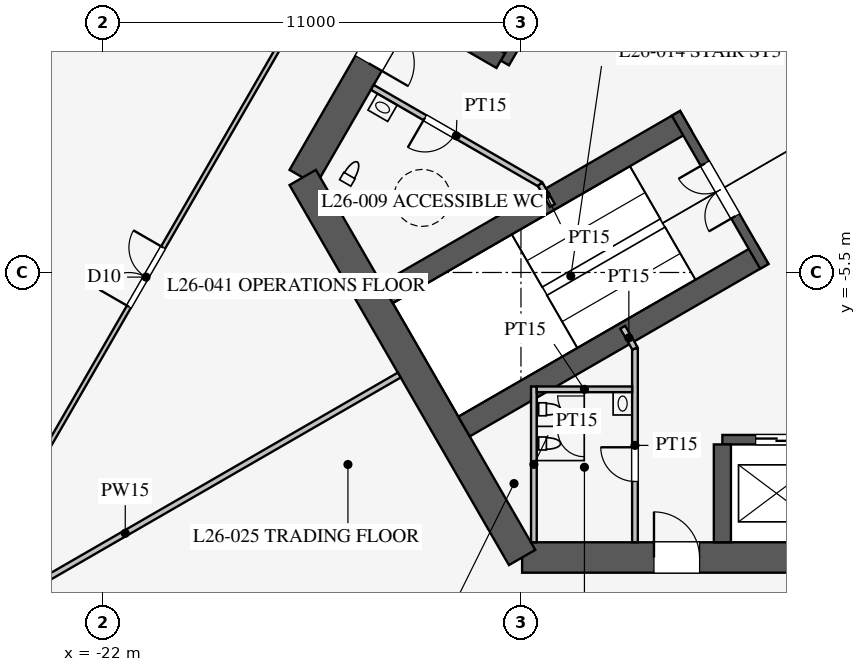
"""IFC4 building model, lengths in metres.
Left out: names, types, materials, properties, quantities, classifications, styles, units other than length and angle.
Written with IfcOpenShell. Run it as: python <this file> out.ifc"""

import sys

from ifc_helpers import new_model, si_unit, direction, frame, frame_2d, origin, place, context, subcontext, project, spatial, rectangle, extrude, element, fill, save


model = new_model("IFC4")
c1 = context("Model", 3, precision=1e-05, world=origin(), true_north=direction((0.0, 1.0)))
c2 = subcontext(c1, "Body", "Model", "MODEL_VIEW")
j1 = project(units=[si_unit("LENGTHUNIT", "METRE"), si_unit("PLANEANGLEUNIT", "RADIAN")], contexts=[c1])
p1 = place(None, origin())
s1 = spatial("IfcSite", under=j1, at=p1, CompositionType="ELEMENT")
p2 = place(p1, origin())
s2 = spatial("IfcBuilding", under=s1, at=p2, CompositionType="ELEMENT")
p3 = place(p2, frame((0.0, 0.0, 115.7)))
s3 = spatial("IfcBuildingStorey", under=s2, at=p3, CompositionType="ELEMENT", Elevation=115.7)
p4 = place(p3, frame((-10.97, -13.0, 0.0), z_axis=(0.0, 0.0, 1.0), x_axis=(1.0, 0.0, 0.0)))
e1 = element("IfcWall", 1, at=p4, inside=s3, PredefinedType="SHEAR", context=c2, shape_type="SweptSolid", body=[
    extrude(rectangle(XDim=21.939, YDim=0.8, at=frame_2d((10.97, 0.0))), origin(), (0.0, 0.0, 1.0), 4.2),
])
p5 = place(p4, frame((17.27, 0.0, 0.0)))
e2 = element("IfcOpeningElement", 2, at=p5, cuts=e1, PredefinedType="OPENING", context=c2, shape_type="SweptSolid", body=[
    extrude(rectangle(XDim=1.2, YDim=2.1, at=frame_2d((0.6, 1.05))), frame((0.0, 0.41, 0.0), z_axis=(0.0, -1.0, 0.0), x_axis=(1.0, 0.0, 0.0)), (0.0, 0.0, 1.0), 0.82),
])
p6 = place(p4, frame((3.47, 0.0, 0.0)))
e3 = element("IfcOpeningElement", 3, at=p6, cuts=e1, PredefinedType="OPENING", context=c2, shape_type="SweptSolid", body=[
    extrude(rectangle(XDim=1.2, YDim=2.1, at=frame_2d((0.6, 1.05))), frame((0.0, 0.41, 0.0), z_axis=(0.0, -1.0, 0.0), x_axis=(1.0, 0.0, 0.0)), (0.0, 0.0, 1.0), 0.82),
])
p7 = place(p3, frame((-5.773, 16.0, 0.0), z_axis=(0.0, 0.0, 1.0), x_axis=(-0.500002442456, -0.866023993627, 0.0)))
e4 = element("IfcWall", 4, at=p7, inside=s3, PredefinedType="SHEAR", context=c2, shape_type="SweptSolid", body=[
    extrude(rectangle(XDim=21.939, YDim=0.8, at=frame_2d((10.97, 0.0))), origin(), (0.0, 0.0, 1.0), 4.2),
])
p8 = place(p7, frame((17.27, 0.0, 0.0)))
e5 = element("IfcOpeningElement", 5, at=p8, cuts=e4, PredefinedType="OPENING", context=c2, shape_type="SweptSolid", body=[
    extrude(rectangle(XDim=1.2, YDim=2.1, at=frame_2d((0.6, 1.05))), frame((0.0, 0.41, 0.0), z_axis=(0.0, -1.0, 0.0), x_axis=(1.0, 0.0, 0.0)), (0.0, 0.0, 1.0), 0.82),
])
p9 = place(p7, frame((3.47, 0.0, 0.0)))
e6 = element("IfcOpeningElement", 6, at=p9, cuts=e4, PredefinedType="OPENING", context=c2, shape_type="SweptSolid", body=[
    extrude(rectangle(XDim=1.2, YDim=2.1, at=frame_2d((0.6, 1.05))), frame((0.0, 0.41, 0.0), z_axis=(0.0, -1.0, 0.0), x_axis=(1.0, 0.0, 0.0)), (0.0, 0.0, 1.0), 0.82),
])
p10 = place(p3, frame((-16.743, -3.0, 0.0), z_axis=(0.0, 0.0, 1.0), x_axis=(0.499995765644, -0.866027848477, 0.0)))
e7 = element("IfcWall", 7, at=p10, inside=s3, PredefinedType="SHEAR", context=c2, shape_type="SweptSolid", body=[
    extrude(rectangle(XDim=11.547, YDim=0.8, at=frame_2d((5.773, 0.0))), origin(), (0.0, 0.0, 1.0), 4.2),
])
p11 = place(p3, frame((-5.7, -9.9, 0.0), z_axis=(0.0, 0.0, 1.0), x_axis=(1.0, 0.0, 0.0)))
e8 = element("IfcWall", 8, at=p11, inside=s3, PredefinedType="SHEAR", context=c2, shape_type="SweptSolid", body=[
    extrude(rectangle(XDim=11.4, YDim=0.25, at=frame_2d((5.7, 0.0))), origin(), (0.0, 0.0, 1.0), 4.2),
])
p12 = place(p11, frame((0.875, 0.0, 0.0)))
e9 = element("IfcOpeningElement", 9, at=p12, cuts=e8, PredefinedType="OPENING", context=c2, shape_type="SweptSolid", body=[
    extrude(rectangle(XDim=1.1, YDim=2.2, at=frame_2d((0.55, 1.1))), frame((0.0, 0.135, 0.0), z_axis=(0.0, -1.0, 0.0), x_axis=(1.0, 0.0, 0.0)), (0.0, 0.0, 1.0), 0.27),
])
p13 = place(p11, frame((3.725, 0.0, 0.0)))
e10 = element("IfcOpeningElement", 10, at=p13, cuts=e8, PredefinedType="OPENING", context=c2, shape_type="SweptSolid", body=[
    extrude(rectangle(XDim=1.1, YDim=2.2, at=frame_2d((0.55, 1.1))), frame((0.0, 0.135, 0.0), z_axis=(0.0, -1.0, 0.0), x_axis=(1.0, 0.0, 0.0)), (0.0, 0.0, 1.0), 0.27),
])
p14 = place(p11, frame((6.575, 0.0, 0.0)))
e11 = element("IfcOpeningElement", 11, at=p14, cuts=e8, PredefinedType="OPENING", context=c2, shape_type="SweptSolid", body=[
    extrude(rectangle(XDim=1.1, YDim=2.2, at=frame_2d((0.55, 1.1))), frame((0.0, 0.135, 0.0), z_axis=(0.0, -1.0, 0.0), x_axis=(1.0, 0.0, 0.0)), (0.0, 0.0, 1.0), 0.27),
])
p15 = place(p11, frame((9.425, 0.0, 0.0)))
e12 = element("IfcOpeningElement", 12, at=p15, cuts=e8, PredefinedType="OPENING", context=c2, shape_type="SweptSolid", body=[
    extrude(rectangle(XDim=1.1, YDim=2.2, at=frame_2d((0.55, 1.1))), frame((0.0, 0.135, 0.0), z_axis=(0.0, -1.0, 0.0), x_axis=(1.0, 0.0, 0.0)), (0.0, 0.0, 1.0), 0.27),
])
p16 = place(p3, frame((-5.7, -10.025, 0.0), z_axis=(0.0, 0.0, 1.0), x_axis=(0.0, -1.0, 0.0)))
e13 = element("IfcWall", 13, at=p16, inside=s3, PredefinedType="SHEAR", context=c2, shape_type="SweptSolid", body=[
    extrude(rectangle(XDim=2.575, YDim=0.45, at=frame_2d((1.288, 0.0))), origin(), (0.0, 0.0, 1.0), 4.2),
])
p17 = place(p3, frame((-5.724, 9.886, 0.0), z_axis=(0.0, 0.0, 1.0), x_axis=(-0.500001763848, -0.866024385424, 0.0)))
e14 = element("IfcWall", 14, at=p17, inside=s3, PredefinedType="SHEAR", context=c2, shape_type="SweptSolid", body=[
    extrude(rectangle(XDim=11.4, YDim=0.25, at=frame_2d((5.7, 0.0))), origin(), (0.0, 0.0, 1.0), 4.2),
])
p18 = place(p17, frame((6.525, 0.0, 0.0)))
e15 = element("IfcOpeningElement", 15, at=p18, cuts=e14, PredefinedType="OPENING", context=c2, shape_type="SweptSolid", body=[
    extrude(rectangle(XDim=1.2, YDim=2.2, at=frame_2d((0.6, 1.1))), frame((0.0, 0.135, 0.0), z_axis=(0.0, -1.0, 0.0), x_axis=(1.0, 0.0, 0.0)), (0.0, 0.0, 1.0), 0.27),
])
p19 = place(p17, frame((9.375, 0.0, 0.0)))
e16 = element("IfcOpeningElement", 16, at=p19, cuts=e14, PredefinedType="OPENING", context=c2, shape_type="SweptSolid", body=[
    extrude(rectangle(XDim=1.2, YDim=2.2, at=frame_2d((0.6, 1.1))), frame((0.0, 0.135, 0.0), z_axis=(0.0, -1.0, 0.0), x_axis=(1.0, 0.0, 0.0)), (0.0, 0.0, 1.0), 0.27),
])
p20 = place(p3, frame((-11.532, 0.076, 0.0), z_axis=(0.0, 0.0, 1.0), x_axis=(-0.866005588531, 0.500034319456, 0.0)))
e17 = element("IfcWall", 17, at=p20, inside=s3, PredefinedType="SHEAR", context=c2, shape_type="SweptSolid", body=[
    extrude(rectangle(XDim=2.575, YDim=0.45, at=frame_2d((1.288, 0.0))), origin(), (0.0, 0.0, 1.0), 4.2),
])
for number, where, z_axis, x_axis in (
    (18, (-6.663, -1.509, 0.0), (0.0, 0.0, 1.0), (-0.866, -0.5, 0.0)),
    (19, (-4.638, -5.016, 0.0), (0.0, 0.0, 1.0), (-0.866, -0.5, 0.0)),
):
    element("IfcWall", number, at=place(p3, frame(where, z_axis=z_axis, x_axis=x_axis)), inside=s3, PredefinedType="SHEAR", context=c2, shape_type="SweptSolid", body=[
        extrude(rectangle(XDim=9.075, YDim=0.6, at=frame_2d((4.538, 0.0))), origin(), (0.0, 0.0, 1.0), 4.2),
    ])
p21 = place(p3, frame((-6.922, -1.312, 0.0), z_axis=(0.0, 0.0, 1.0), x_axis=(0.499984536904, -0.866034331223, 0.0)))
e20 = element("IfcWall", 20, at=p21, inside=s3, PredefinedType="SHEAR", context=c2, shape_type="SweptSolid", body=[
    extrude(rectangle(XDim=4.65, YDim=0.25, at=frame_2d((2.325, 0.0))), origin(), (0.0, 0.0, 1.0), 4.2),
])
p22 = place(p21, frame((1.525, 0.0, 0.0)))
e21 = element("IfcOpeningElement", 21, at=p22, cuts=e20, PredefinedType="OPENING", context=c2, shape_type="SweptSolid", body=[
    extrude(rectangle(XDim=1.6, YDim=2.1, at=frame_2d((0.8, 1.05))), frame((0.0, 0.135, 0.0), z_axis=(0.0, -1.0, 0.0), x_axis=(1.0, 0.0, 0.0)), (0.0, 0.0, 1.0), 0.27),
])
p23 = place(p3, frame((-8.0, -7.5, 0.0), z_axis=(0.0, 0.0, 1.0), x_axis=(0.0, -1.0, 0.0)))
e22 = element("IfcWall", 22, at=p23, inside=s3, PredefinedType="PARTITIONING", context=c2, shape_type="SweptSolid", body=[
    extrude(rectangle(XDim=5.1, YDim=0.15, at=frame_2d((2.55, 0.0))), origin(), (0.0, 0.0, 1.0), 4.0),
])
p24 = place(p23, frame((2.6, 0.0, 0.0)))
e23 = element("IfcOpeningElement", 23, at=p24, cuts=e22, PredefinedType="OPENING", context=c2, shape_type="SweptSolid", body=[
    extrude(rectangle(XDim=0.9, YDim=2.1, at=frame_2d((0.45, 1.05))), frame((0.0, 0.085, 0.0), z_axis=(0.0, -1.0, 0.0), x_axis=(1.0, 0.0, 0.0)), (0.0, 0.0, 1.0), 0.17),
])
p25 = place(p3, frame((-10.495, -3.178, 0.0), z_axis=(0.0, 0.0, 1.0), x_axis=(-0.86602216432, 0.500005610874, 0.0)))
e24 = element("IfcWall", 24, at=p25, inside=s3, PredefinedType="PARTITIONING", context=c2, shape_type="SweptSolid", body=[
    extrude(rectangle(XDim=5.1, YDim=0.15, at=frame_2d((2.55, 0.0))), origin(), (0.0, 0.0, 1.0), 4.0),
])
p26 = place(p25, frame((2.6, 0.0, 0.0)))
e25 = element("IfcOpeningElement", 25, at=p26, cuts=e24, PredefinedType="OPENING", context=c2, shape_type="SweptSolid", body=[
    extrude(rectangle(XDim=0.9, YDim=2.1, at=frame_2d((0.45, 1.05))), frame((0.0, 0.085, 0.0), z_axis=(0.0, -1.0, 0.0), x_axis=(1.0, 0.0, 0.0)), (0.0, 0.0, 1.0), 0.17),
])
for number, where, z_axis, x_axis in (
    (26, (-10.495, -3.178, 0.0), (0.0, 0.0, 1.0), (0.5, -0.866, 0.0)),
    (27, (-8.0, -7.5, 0.0), (0.0, 0.0, 1.0), (-0.5, 0.866, 0.0)),
):
    element("IfcWall", number, at=place(p3, frame(where, z_axis=z_axis, x_axis=x_axis)), inside=s3, PredefinedType="PARTITIONING", context=c2, shape_type="SweptSolid", body=[
        extrude(rectangle(XDim=0.645, YDim=0.15, at=frame_2d((0.323, 0.0))), origin(), (0.0, 0.0, 1.0), 4.0),
    ])
p27 = place(p3, frame((-10.66, -8.5, 0.0), z_axis=(0.0, 0.0, 1.0), x_axis=(0.0, -1.0, 0.0)))
e28 = element("IfcWall", 28, at=p27, inside=s3, PredefinedType="PARTITIONING", context=c2, shape_type="SweptSolid", body=[
    extrude(rectangle(XDim=4.1, YDim=0.15, at=frame_2d((2.05, 0.0))), origin(), (0.0, 0.0, 1.0), 4.0),
])
p28 = place(p3, frame((-8.075, -8.575, 0.0), z_axis=(0.0, 0.0, 1.0), x_axis=(-1.0, 0.0, 0.0)))
e29 = element("IfcWall", 29, at=p28, inside=s3, PredefinedType="PARTITIONING", context=c2, shape_type="SweptSolid", body=[
    extrude(rectangle(XDim=2.51, YDim=0.15, at=frame_2d((1.255, 0.0))), origin(), (0.0, 0.0, 1.0), 4.0),
])
p29 = place(p3, frame((-14.203, -8.2, 0.0), z_axis=(0.0, 0.0, 1.0), x_axis=(-0.866024668836, -0.500001272966, 0.0)))
e30 = element("IfcWall", 30, at=p29, inside=s3, PredefinedType="PARTITIONING", context=c2, shape_type="SweptSolid", body=[
    extrude(rectangle(XDim=16.65, YDim=0.15, at=frame_2d((8.325, 0.0))), origin(), (0.0, 0.0, 1.0), 2.3),
])
p30 = place(p3, frame((-0.016, 30.491, 0.0), z_axis=(0.0, 0.0, 1.0), x_axis=(-0.50000091641, -0.866024874695, 0.0)))
e31 = element("IfcWall", 31, at=p30, inside=s3, PredefinedType="PARTITIONING", context=c2, shape_type="SweptSolid", body=[
    extrude(rectangle(XDim=52.796, YDim=0.12, at=frame_2d((26.398, 0.0))), origin(), (0.0, 0.0, 1.0), 2.9),
])
p31 = place(p30, frame((10.2, 0.0, 0.15)))
e32 = element("IfcOpeningElement", 32, at=p31, cuts=e31, PredefinedType="OPENING", context=c2, shape_type="SweptSolid", body=[
    extrude(rectangle(XDim=1.8, YDim=2.1, at=frame_2d((0.9, 1.05))), frame((0.0, 0.07, 0.0), z_axis=(0.0, -1.0, 0.0), x_axis=(1.0, 0.0, 0.0)), (0.0, 0.0, 1.0), 0.14),
])
p32 = place(p30, frame((40.8, 0.0, 0.15)))
e33 = element("IfcOpeningElement", 33, at=p32, cuts=e31, PredefinedType="OPENING", context=c2, shape_type="SweptSolid", body=[
    extrude(rectangle(XDim=1.8, YDim=2.1, at=frame_2d((0.9, 1.05))), frame((0.0, 0.07, 0.0), z_axis=(0.0, -1.0, 0.0), x_axis=(1.0, 0.0, 0.0)), (0.0, 0.0, 1.0), 0.14),
])
p33 = place(p24, frame((0.9, 0.0, 0.0), z_axis=(0.0, 0.0, 1.0), x_axis=(-1.0, 0.0, 0.0)))
e34 = element("IfcDoor", 34, at=p33, inside=s3, OperationType="SINGLE_SWING_RIGHT", PredefinedType="DOOR", context=c2, shape_type="SweptSolid", body=[
    extrude(rectangle(XDim=0.9, YDim=2.1, at=frame_2d((0.45, 1.05))), frame((0.0, 0.025, 0.0), z_axis=(0.0, -1.0, 0.0), x_axis=(1.0, 0.0, 0.0)), (0.0, 0.0, 1.0), 0.05),
])
fill(e23, e34)
p34 = place(p26, origin())
e35 = element("IfcDoor", 35, at=p34, inside=s3, OperationType="SINGLE_SWING_RIGHT", PredefinedType="DOOR", context=c2, shape_type="SweptSolid", body=[
    extrude(rectangle(XDim=0.9, YDim=2.1, at=frame_2d((0.45, 1.05))), frame((0.0, 0.025, 0.0), z_axis=(0.0, -1.0, 0.0), x_axis=(1.0, 0.0, 0.0)), (0.0, 0.0, 1.0), 0.05),
])
fill(e25, e35)
p35 = place(p22, frame((1.6, 0.0, 0.0), z_axis=(0.0, 0.0, 1.0), x_axis=(-1.0, 0.0, 0.0)))
e36 = element("IfcDoor", 36, at=p35, inside=s3, OperationType="DOUBLE_DOOR_SINGLE_SWING", PredefinedType="DOOR", context=c2, shape_type="SweptSolid", body=[
    extrude(rectangle(XDim=1.6, YDim=2.1, at=frame_2d((0.8, 1.05))), frame((0.0, 0.025, 0.0), z_axis=(0.0, -1.0, 0.0), x_axis=(1.0, 0.0, 0.0)), (0.0, 0.0, 1.0), 0.05),
])
fill(e21, e36)
p36 = place(p6, origin())
e37 = element("IfcDoor", 37, at=p36, inside=s3, OperationType="SINGLE_SWING_LEFT", PredefinedType="DOOR", context=c2, shape_type="SweptSolid", body=[
    extrude(rectangle(XDim=1.2, YDim=2.1, at=frame_2d((0.6, 1.05))), frame((0.0, 0.025, 0.0), z_axis=(0.0, -1.0, 0.0), x_axis=(1.0, 0.0, 0.0)), (0.0, 0.0, 1.0), 0.05),
])
fill(e3, e37)
p37 = place(p8, origin())
e38 = element("IfcDoor", 38, at=p37, inside=s3, OperationType="SINGLE_SWING_RIGHT", PredefinedType="DOOR", context=c2, shape_type="SweptSolid", body=[
    extrude(rectangle(XDim=1.2, YDim=2.1, at=frame_2d((0.6, 1.05))), frame((0.0, 0.025, 0.0), z_axis=(0.0, -1.0, 0.0), x_axis=(1.0, 0.0, 0.0)), (0.0, 0.0, 1.0), 0.05),
])
fill(e5, e38)
p38 = place(p32, frame((1.8, 0.0, 0.0), z_axis=(0.0, 0.0, 1.0), x_axis=(-1.0, 0.0, 0.0)))
e39 = element("IfcDoor", 39, at=p38, inside=s3, OperationType="DOUBLE_DOOR_SINGLE_SWING", PredefinedType="DOOR", context=c2, shape_type="SweptSolid", body=[
    extrude(rectangle(XDim=1.8, YDim=2.1, at=frame_2d((0.9, 1.05))), frame((0.0, 0.025, 0.0), z_axis=(0.0, -1.0, 0.0), x_axis=(1.0, 0.0, 0.0)), (0.0, 0.0, 1.0), 0.05),
])
fill(e33, e39)
p39 = place(p12, origin())
e40 = element("IfcDoor", 40, at=p39, inside=s3, OperationType="DOUBLE_DOOR_SLIDING", PredefinedType="DOOR", context=c2, shape_type="SweptSolid", body=[
    extrude(rectangle(XDim=1.1, YDim=2.2, at=frame_2d((0.55, 1.1))), frame((0.0, 0.025, 0.0), z_axis=(0.0, -1.0, 0.0), x_axis=(1.0, 0.0, 0.0)), (0.0, 0.0, 1.0), 0.05),
])
fill(e9, e40)
save(model, sys.argv[1])
